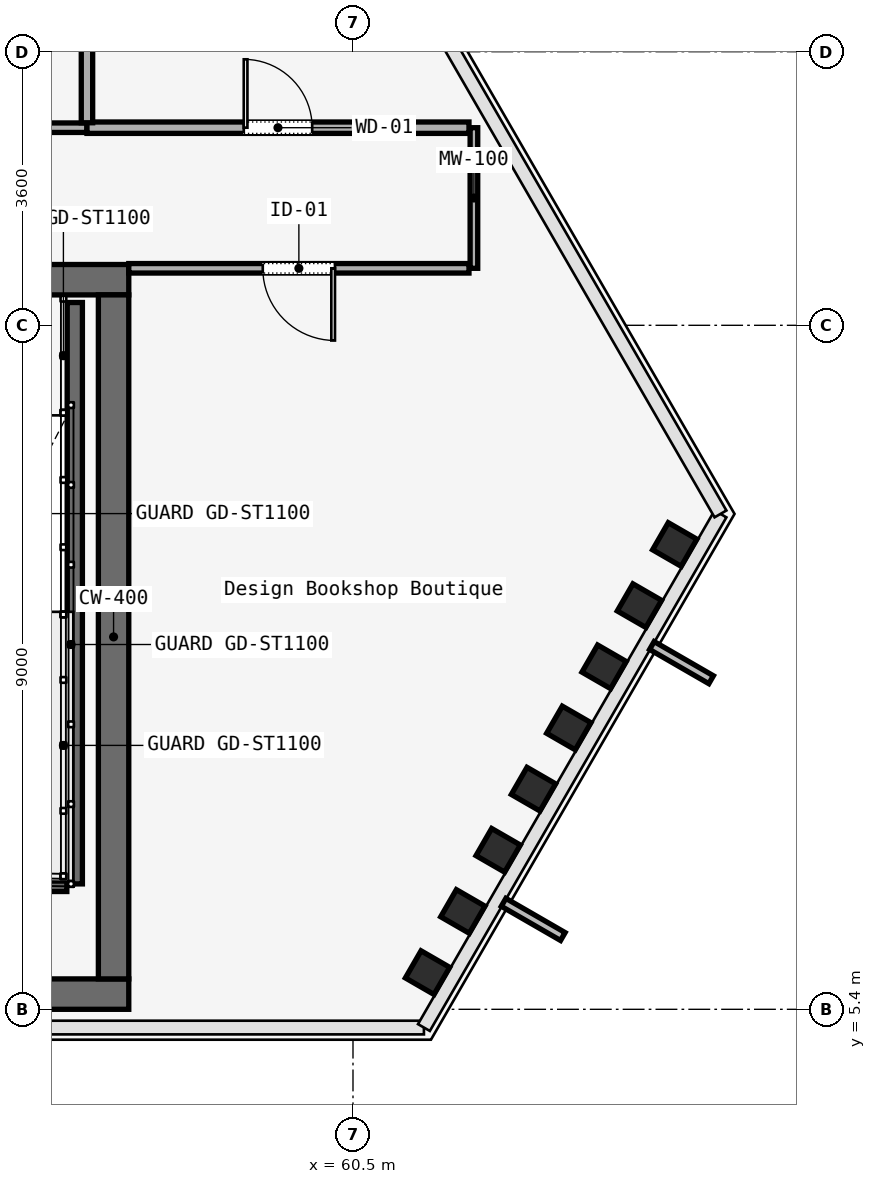
"""IFC4 building model, lengths in metres.
Left out: names, types, materials, properties, quantities, classifications, styles, units other than length and angle.
Written with IfcOpenShell. Run it as: python <this file> out.ifc"""

import sys

from ifc_helpers import new_model, si_unit, direction, frame, frame_2d, origin, origin_2d, place, context, subcontext, project, spatial, rectangle, i_section, extrude, element, fill, save


model = new_model("IFC4")
c1 = context("Model", 3, precision=1e-05, world=origin(), true_north=direction((0.0, 1.0)))
c2 = subcontext(c1, "Body", "Model", "MODEL_VIEW")
j1 = project(units=[si_unit("LENGTHUNIT", "METRE"), si_unit("PLANEANGLEUNIT", "RADIAN")], contexts=[c1])
p1 = place(None, origin())
s1 = spatial("IfcSite", under=j1, at=p1, CompositionType="ELEMENT")
p2 = place(p1, origin())
s2 = spatial("IfcBuilding", under=s1, at=p2, CompositionType="ELEMENT")
p3 = place(p2, frame((0.0, 0.0, 225.6)))
s3 = spatial("IfcBuildingStorey", under=s2, at=p3, CompositionType="ELEMENT", Elevation=225.6)
p4 = place(p3, frame((26.45, 15.0, 0.0), z_axis=(0.0, 0.0, 1.0), x_axis=(1.0, 0.0, 0.0)))
e1 = element("IfcWall", 1, at=p4, inside=s3, PredefinedType="SOLIDWALL", context=c2, shape_type="SweptSolid", body=[
    extrude(rectangle(XDim=31.1, YDim=0.4, at=frame_2d((15.55, 0.0))), origin(), (0.0, 0.0, 1.0), 3.58),
])
p5 = place(p4, frame((1.65, 0.0, 0.0)))
e2 = element("IfcOpeningElement", 2, at=p5, cuts=e1, PredefinedType="OPENING", context=c2, shape_type="SweptSolid", body=[
    extrude(rectangle(XDim=1.1, YDim=2.2, at=frame_2d((0.55, 1.1))), frame((0.0, 0.2, 0.0), z_axis=(0.0, -1.0, 0.0), x_axis=(1.0, 0.0, 0.0)), (0.0, 0.0, 1.0), 0.4),
])
p6 = place(p4, frame((13.65, 0.0, 0.0)))
e3 = element("IfcOpeningElement", 3, at=p6, cuts=e1, PredefinedType="OPENING", context=c2, shape_type="SweptSolid", body=[
    extrude(rectangle(XDim=1.1, YDim=2.2, at=frame_2d((0.55, 1.1))), frame((0.0, 0.2, 0.0), z_axis=(0.0, -1.0, 0.0), x_axis=(1.0, 0.0, 0.0)), (0.0, 0.0, 1.0), 0.4),
])
p7 = place(p4, frame((25.55, 0.0, 0.0)))
e4 = element("IfcOpeningElement", 4, at=p7, cuts=e1, PredefinedType="OPENING", context=c2, shape_type="SweptSolid", body=[
    extrude(rectangle(XDim=1.1, YDim=2.2, at=frame_2d((0.55, 1.1))), frame((0.0, 0.2, 0.0), z_axis=(0.0, -1.0, 0.0), x_axis=(1.0, 0.0, 0.0)), (0.0, 0.0, 1.0), 0.4),
])
p8 = place(p4, frame((19.35, 0.0, 0.0)))
e5 = element("IfcOpeningElement", 5, at=p8, cuts=e1, PredefinedType="OPENING", context=c2, shape_type="SweptSolid", body=[
    extrude(rectangle(XDim=1.1, YDim=2.2, at=frame_2d((0.55, 1.1))), frame((0.0, 0.2, 0.0), z_axis=(0.0, -1.0, 0.0), x_axis=(1.0, 0.0, 0.0)), (0.0, 0.0, 1.0), 0.4),
])
p9 = place(p4, frame((21.4, 0.0, 0.0)))
e6 = element("IfcOpeningElement", 6, at=p9, cuts=e1, PredefinedType="OPENING", context=c2, shape_type="SweptSolid", body=[
    extrude(rectangle(XDim=0.9, YDim=2.1, at=frame_2d((0.45, 1.05))), frame((0.0, 0.2, 0.0), z_axis=(0.0, -1.0, 0.0), x_axis=(1.0, 0.0, 0.0)), (0.0, 0.0, 1.0), 0.4),
])
p10 = place(p4, frame((6.04, 0.0, 0.0)))
e7 = element("IfcOpeningElement", 7, at=p10, cuts=e1, PredefinedType="OPENING", context=c2, shape_type="SweptSolid", body=[
    extrude(rectangle(XDim=0.95, YDim=2.2, at=frame_2d((0.475, 1.1))), frame((0.0, 0.2, 0.0), z_axis=(0.0, -1.0, 0.0), x_axis=(1.0, 0.0, 0.0)), (0.0, 0.0, 1.0), 0.4),
])
p11 = place(p4, frame((9.99, 0.0, 0.0)))
e8 = element("IfcOpeningElement", 8, at=p11, cuts=e1, PredefinedType="OPENING", context=c2, shape_type="SweptSolid", body=[
    extrude(rectangle(XDim=0.95, YDim=2.2, at=frame_2d((0.475, 1.1))), frame((0.0, 0.2, 0.0), z_axis=(0.0, -1.0, 0.0), x_axis=(1.0, 0.0, 0.0)), (0.0, 0.0, 1.0), 0.4),
])
p12 = place(p4, frame((23.35, 0.0, 0.0)))
e9 = element("IfcOpeningElement", 9, at=p12, cuts=e1, PredefinedType="OPENING", context=c2, shape_type="SweptSolid", body=[
    extrude(rectangle(XDim=1.3, YDim=2.3, at=frame_2d((0.65, 1.15))), frame((0.0, 0.2, 0.0), z_axis=(0.0, -1.0, 0.0), x_axis=(1.0, 0.0, 0.0)), (0.0, 0.0, 1.0), 0.4),
])
p13 = place(p3, frame((26.45, 5.6, 0.0), z_axis=(0.0, 0.0, 1.0), x_axis=(1.0, 0.0, 0.0)))
e10 = element("IfcWall", 10, at=p13, inside=s3, PredefinedType="SOLIDWALL", context=c2, shape_type="SweptSolid", body=[
    extrude(rectangle(XDim=31.1, YDim=0.4, at=frame_2d((15.55, 0.0))), origin(), (0.0, 0.0, 1.0), 3.58),
])
p14 = place(p3, frame((57.35, 5.8, 0.0), z_axis=(0.0, 0.0, 1.0), x_axis=(0.0, 1.0, 0.0)))
e11 = element("IfcWall", 11, at=p14, inside=s3, PredefinedType="SOLIDWALL", context=c2, shape_type="SweptSolid", body=[
    extrude(rectangle(XDim=9.0, YDim=0.4, at=frame_2d((4.5, 0.0))), origin(), (0.0, 0.0, 1.0), 3.58),
])
p15 = place(p3, frame((61.481, 5.882, 0.0), z_axis=(0.032512304467, -0.009133435637, 0.999429602529), x_axis=(-0.69804908245, 0.715452392755, 0.029246404757)))
e12 = element("IfcColumn", 12, at=p15, inside=s3, PredefinedType="COLUMN", context=c2, shape_type="SweptSolid", body=[
    extrude(i_section(OverallWidth=0.412, OverallDepth=0.435, WebThickness=0.036, FlangeThickness=0.044, FilletRadius=0.015, at=origin_2d()), origin(), (0.0, 0.0, 1.0), 3.582),
])
p16 = place(p3, frame((61.946, 6.687, 0.0), z_axis=(0.022014623846, -0.02739900553, 0.999382134538), x_axis=(-0.152327641316, 0.987861213843, 0.030438657581)))
e13 = element("IfcColumn", 13, at=p16, inside=s3, PredefinedType="COLUMN", context=c2, shape_type="SweptSolid", body=[
    extrude(i_section(OverallWidth=0.412, OverallDepth=0.435, WebThickness=0.036, FlangeThickness=0.044, FilletRadius=0.015, at=origin_2d()), origin(), (0.0, 0.0, 1.0), 3.582),
])
p17 = place(p3, frame((62.41, 7.492, 0.0), z_axis=(0.011444718102, -0.045642625765, 0.998892271039), x_axis=(0.274587327315, 0.96069824947, 0.040751357577)))
e14 = element("IfcColumn", 14, at=p17, inside=s3, PredefinedType="COLUMN", context=c2, shape_type="SweptSolid", body=[
    extrude(i_section(OverallWidth=0.412, OverallDepth=0.435, WebThickness=0.036, FlangeThickness=0.044, FilletRadius=0.015, at=origin_2d()), origin(), (0.0, 0.0, 1.0), 3.584),
])
p18 = place(p3, frame((62.875, 8.297, 0.0), z_axis=(0.000884780272, -0.063772239608, 0.997964086838), x_axis=(0.487962206746, 0.871115448004, 0.055233694748)))
e15 = element("IfcColumn", 15, at=p18, inside=s3, PredefinedType="COLUMN", context=c2, shape_type="SweptSolid", body=[
    extrude(i_section(OverallWidth=0.412, OverallDepth=0.435, WebThickness=0.036, FlangeThickness=0.044, FilletRadius=0.015, at=origin_2d()), origin(), (0.0, 0.0, 1.0), 3.587),
])
p19 = place(p3, frame((63.339, 9.102, 0.0), z_axis=(-0.009651199464, -0.081967229252, 0.99658829397), x_axis=(0.597494419555, 0.798681156256, 0.071476074611)))
e16 = element("IfcColumn", 16, at=p19, inside=s3, PredefinedType="COLUMN", context=c2, shape_type="SweptSolid", body=[
    extrude(i_section(OverallWidth=0.412, OverallDepth=0.435, WebThickness=0.036, FlangeThickness=0.044, FilletRadius=0.015, at=origin_2d()), origin(), (0.0, 0.0, 1.0), 3.592),
])
p20 = place(p3, frame((63.804, 9.906, 0.0), z_axis=(-0.020081583921, -0.100000860471, 0.99478467916), x_axis=(0.659830353691, 0.746204611865, 0.088332222777)))
e17 = element("IfcColumn", 17, at=p20, inside=s3, PredefinedType="COLUMN", context=c2, shape_type="SweptSolid", body=[
    extrude(i_section(OverallWidth=0.412, OverallDepth=0.435, WebThickness=0.036, FlangeThickness=0.044, FilletRadius=0.015, at=origin_2d()), origin(), (0.0, 0.0, 1.0), 3.599),
])
p21 = place(p3, frame((64.269, 10.711, 0.0), z_axis=(-0.030596538724, -0.117850827252, 0.99255983917), x_axis=(0.699960394522, 0.706354529858, 0.105445361441)))
e18 = element("IfcColumn", 18, at=p21, inside=s3, PredefinedType="COLUMN", context=c2, shape_type="SweptSolid", body=[
    extrude(i_section(OverallWidth=0.412, OverallDepth=0.435, WebThickness=0.036, FlangeThickness=0.044, FilletRadius=0.015, at=origin_2d()), origin(), (0.0, 0.0, 1.0), 3.607),
])
p22 = place(p3, frame((64.733, 11.516, 0.0), z_axis=(-0.040911322599, -0.135695970997, 0.989905483942), x_axis=(0.726178262725, 0.676461219214, 0.122740986008)))
e19 = element("IfcColumn", 19, at=p22, inside=s3, PredefinedType="COLUMN", context=c2, shape_type="SweptSolid", body=[
    extrude(i_section(OverallWidth=0.412, OverallDepth=0.435, WebThickness=0.036, FlangeThickness=0.044, FilletRadius=0.015, at=origin_2d()), origin(), (0.0, 0.0, 1.0), 3.616),
])
p23 = place(p3, frame((56.84, 14.7, 0.0), z_axis=(0.0, 0.0, 1.0), x_axis=(0.0, -1.0, 0.0)))
e20 = element("IfcWall", 20, at=p23, inside=s3, PredefinedType="SOLIDWALL", context=c2, shape_type="SweptSolid", body=[
    extrude(rectangle(XDim=7.65, YDim=0.2, at=frame_2d((3.825, 0.0))), origin(), (0.0, 0.0, 1.0), 3.8),
])
p24 = place(p3, frame((53.62, 7.05, 0.0), z_axis=(0.0, 0.0, 1.0), x_axis=(1.0, 0.0, 0.0)))
e21 = element("IfcWall", 21, at=p24, inside=s3, PredefinedType="SOLIDWALL", context=c2, shape_type="SweptSolid", body=[
    extrude(rectangle(XDim=3.115, YDim=0.2, at=frame_2d((1.558, 0.0))), origin(), (0.0, 0.0, 1.0), 3.8),
])
p25 = place(p3, frame((62.091, 17.0, 0.0), z_axis=(0.0, 0.0, 1.0), x_axis=(0.0, -1.0, 0.0)))
e22 = element("IfcWall", 22, at=p25, inside=s3, PredefinedType="MOVABLE", context=c2, shape_type="SweptSolid", body=[
    extrude(rectangle(XDim=1.85, YDim=0.1, at=frame_2d((0.925, 0.0))), origin(), (0.0, 0.0, 1.0), 3.01),
])
p26 = place(p3, frame((62.026, 15.15, 0.0), z_axis=(0.0, 0.0, 1.0), x_axis=(-1.0, 0.0, 0.0)))
e23 = element("IfcWall", 23, at=p26, inside=s3, PredefinedType="PARTITIONING", context=c2, shape_type="SweptSolid", body=[
    extrude(rectangle(XDim=4.476, YDim=0.125, at=frame_2d((2.238, 0.0))), origin(), (0.0, 0.0, 1.0), 3.01),
])
p27 = place(p26, frame((1.763, 0.0, 0.0)))
e24 = element("IfcOpeningElement", 24, at=p27, cuts=e23, PredefinedType="OPENING", context=c2, shape_type="SweptSolid", body=[
    extrude(rectangle(XDim=0.95, YDim=2.2, at=frame_2d((0.475, 1.1))), frame((0.0, 0.062, 0.0), z_axis=(0.0, -1.0, 0.0), x_axis=(1.0, 0.0, 0.0)), (0.0, 0.0, 1.0), 0.125),
])
p28 = place(p3, frame((51.8, 17.0, 0.0), z_axis=(0.0, 0.0, 1.0), x_axis=(1.0, 0.0, 0.0)))
e25 = element("IfcWall", 25, at=p28, inside=s3, PredefinedType="PARTITIONING", context=c2, shape_type="SweptSolid", body=[
    extrude(rectangle(XDim=5.2, YDim=0.125, at=frame_2d((2.6, 0.0))), origin(), (0.0, 0.0, 1.0), 3.01),
])
p29 = place(p28, frame((2.125, 0.0, 0.0)))
e26 = element("IfcOpeningElement", 26, at=p29, cuts=e25, PredefinedType="OPENING", context=c2, shape_type="SweptSolid", body=[
    extrude(rectangle(XDim=0.95, YDim=2.2, at=frame_2d((0.475, 1.1))), frame((0.0, 0.062, 0.0), z_axis=(0.0, -1.0, 0.0), x_axis=(1.0, 0.0, 0.0)), (0.0, 0.0, 1.0), 0.125),
])
p30 = place(p3, frame((57.0, 17.0, 0.0), z_axis=(0.0, 0.0, 1.0), x_axis=(1.0, 0.0, 0.0)))
e27 = element("IfcWall", 27, at=p30, inside=s3, PredefinedType="PARTITIONING", context=c2, shape_type="SweptSolid", body=[
    extrude(rectangle(XDim=5.026, YDim=0.15, at=frame_2d((2.513, 0.0))), origin(), (0.0, 0.0, 1.0), 3.01),
])
p31 = place(p30, frame((2.063, 0.0, 0.0)))
e28 = element("IfcOpeningElement", 28, at=p31, cuts=e27, PredefinedType="OPENING", context=c2, shape_type="SweptSolid", body=[
    extrude(rectangle(XDim=0.9, YDim=2.15, at=frame_2d((0.45, 1.075))), frame((0.0, 0.075, 0.0), z_axis=(0.0, -1.0, 0.0), x_axis=(1.0, 0.0, 0.0)), (0.0, 0.0, 1.0), 0.15),
])
p32 = place(p3, frame((57.0, 17.065, 0.0), z_axis=(0.0, 0.0, 1.0), x_axis=(0.0, 1.0, 0.0)))
e29 = element("IfcWall", 29, at=p32, inside=s3, PredefinedType="PARTITIONING", context=c2, shape_type="SweptSolid", body=[
    extrude(rectangle(XDim=9.135, YDim=0.15, at=frame_2d((4.567, 0.0))), origin(), (0.0, 0.0, 1.0), 3.01),
])
p33 = place(p27, origin())
e30 = element("IfcDoor", 30, at=p33, inside=s3, OperationType="SINGLE_SWING_RIGHT", PredefinedType="DOOR", context=c2, shape_type="SweptSolid", body=[
    extrude(rectangle(XDim=0.95, YDim=2.2, at=frame_2d((0.475, 1.1))), frame((0.0, 0.025, 0.0), z_axis=(0.0, -1.0, 0.0), x_axis=(1.0, 0.0, 0.0)), (0.0, 0.0, 1.0), 0.05),
])
fill(e24, e30)
p34 = place(p31, origin())
e31 = element("IfcDoor", 31, at=p34, inside=s3, OperationType="SINGLE_SWING_LEFT", PredefinedType="DOOR", context=c2, shape_type="SweptSolid", body=[
    extrude(rectangle(XDim=0.9, YDim=2.15, at=frame_2d((0.45, 1.075))), frame((0.0, 0.025, 0.0), z_axis=(0.0, -1.0, 0.0), x_axis=(1.0, 0.0, 0.0)), (0.0, 0.0, 1.0), 0.05),
])
fill(e28, e31)
save(model, sys.argv[1])
